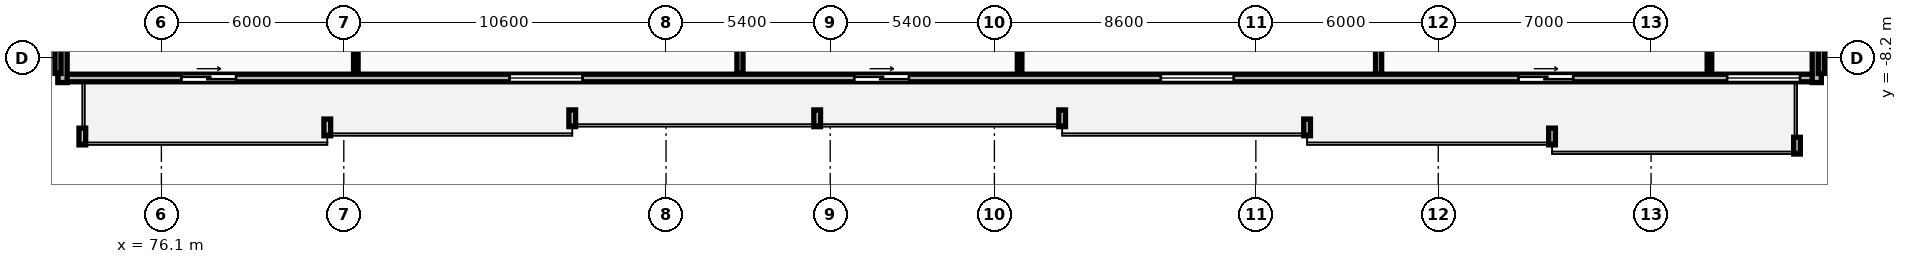
"""IFC4 building model, lengths in metres.
Left out: names, types, materials, properties, quantities, classifications, styles, units other than length and angle.
Written with IfcOpenShell. Run it as: python <this file> out.ifc"""

import sys

from ifc_helpers import new_model, si_unit, direction, frame, frame_2d, origin, place, context, subcontext, project, spatial, rectangle, extrude, element, fill, save


model = new_model("IFC4")
c1 = context("Model", 3, precision=1e-05, world=origin(), true_north=direction((0.0, 1.0)))
c2 = subcontext(c1, "Body", "Model", "MODEL_VIEW")
j1 = project(units=[si_unit("LENGTHUNIT", "METRE"), si_unit("PLANEANGLEUNIT", "RADIAN")], contexts=[c1])
p1 = place(None, origin())
s1 = spatial("IfcSite", under=j1, at=p1, CompositionType="ELEMENT")
p2 = place(p1, origin())
s2 = spatial("IfcBuilding", under=s1, at=p2, CompositionType="ELEMENT")
p3 = place(p2, frame((0.0, 0.0, 153.7)))
s3 = spatial("IfcBuildingStorey", under=s2, at=p3, CompositionType="ELEMENT", Elevation=153.7)
p4 = place(p3, frame((72.7, -8.85, 0.0), z_axis=(0.0, 0.0, 1.0), x_axis=(1.0, 0.0, 0.0)))
e1 = element("IfcWall", 1, at=p4, inside=s3, PredefinedType="STANDARD", context=c2, shape_type="SweptSolid", body=[
    extrude(rectangle(XDim=58.0, YDim=0.25, at=frame_2d((29.0, 0.0))), origin(), (0.0, 0.0, 1.0), 3.32),
])
p5 = place(p4, frame((4.058, 0.0, 0.0)))
e2 = element("IfcOpeningElement", 2, at=p5, cuts=e1, PredefinedType="OPENING", context=c2, shape_type="SweptSolid", body=[
    extrude(rectangle(XDim=1.8, YDim=2.2, at=frame_2d((0.9, 1.1))), frame((0.0, 0.135, 0.0), z_axis=(0.0, -1.0, 0.0), x_axis=(1.0, 0.0, 0.0)), (0.0, 0.0, 1.0), 0.27),
])
p6 = place(p4, frame((14.854, 0.0, 0.85)))
e3 = element("IfcOpeningElement", 3, at=p6, cuts=e1, PredefinedType="OPENING", context=c2, shape_type="SweptSolid", body=[
    extrude(rectangle(XDim=2.4, YDim=1.9, at=frame_2d((1.2, 0.95))), frame((0.0, 0.135, 0.0), z_axis=(0.0, -1.0, 0.0), x_axis=(1.0, 0.0, 0.0)), (0.0, 0.0, 1.0), 0.27),
])
p7 = place(p4, frame((26.191, 0.0, 0.0)))
e4 = element("IfcOpeningElement", 4, at=p7, cuts=e1, PredefinedType="OPENING", context=c2, shape_type="SweptSolid", body=[
    extrude(rectangle(XDim=1.8, YDim=2.2, at=frame_2d((0.9, 1.1))), frame((0.0, 0.135, 0.0), z_axis=(0.0, -1.0, 0.0), x_axis=(1.0, 0.0, 0.0)), (0.0, 0.0, 1.0), 0.27),
])
p8 = place(p4, frame((36.274, 0.0, 0.85)))
e5 = element("IfcOpeningElement", 5, at=p8, cuts=e1, PredefinedType="OPENING", context=c2, shape_type="SweptSolid", body=[
    extrude(rectangle(XDim=2.4, YDim=1.9, at=frame_2d((1.2, 0.95))), frame((0.0, 0.135, 0.0), z_axis=(0.0, -1.0, 0.0), x_axis=(1.0, 0.0, 0.0)), (0.0, 0.0, 1.0), 0.27),
])
p9 = place(p4, frame((48.039, 0.0, 0.0)))
e6 = element("IfcOpeningElement", 6, at=p9, cuts=e1, PredefinedType="OPENING", context=c2, shape_type="SweptSolid", body=[
    extrude(rectangle(XDim=1.8, YDim=2.2, at=frame_2d((0.9, 1.1))), frame((0.0, 0.135, 0.0), z_axis=(0.0, -1.0, 0.0), x_axis=(1.0, 0.0, 0.0)), (0.0, 0.0, 1.0), 0.27),
])
p10 = place(p4, frame((54.9, 0.0, 0.85)))
e7 = element("IfcOpeningElement", 7, at=p10, cuts=e1, PredefinedType="OPENING", context=c2, shape_type="SweptSolid", body=[
    extrude(rectangle(XDim=2.4, YDim=1.9, at=frame_2d((1.2, 0.95))), frame((0.0, 0.135, 0.0), z_axis=(0.0, -1.0, 0.0), x_axis=(1.0, 0.0, 0.0)), (0.0, 0.0, 1.0), 0.27),
])
for number, where, z_axis, x_axis in (
    (8, (130.55, -9.0, 0.0), (0.0, 0.0, 1.0), (0.0, 1.0, 0.0)),
    (9, (72.85, -5.4, 0.0), (0.0, 0.0, 1.0), (0.0, -1.0, 0.0)),
):
    element("IfcWall", number, at=place(p3, frame(where, z_axis=z_axis, x_axis=x_axis)), inside=s3, PredefinedType="STANDARD", context=c2, shape_type="SweptSolid", body=[
        extrude(rectangle(XDim=3.6, YDim=0.3, at=frame_2d((1.8, 0.0))), origin(), (0.0, 0.0, 1.0), 3.32),
    ])
for number, where, z_axis, x_axis in (
    (10, (72.7, -8.7, 0.0), (0.0, 0.0, 1.0), (0.0, 1.0, 0.0)),
    (11, (130.7, -8.7, 0.0), (0.0, 0.0, 1.0), (0.0, 1.0, 0.0)),
    (12, (95.132, -8.7, 0.0), (0.0, 0.0, 1.0), (0.0, 1.0, 0.0)),
):
    element("IfcWall", number, at=place(p3, frame(where, z_axis=z_axis, x_axis=x_axis)), inside=s3, PredefinedType="PARTITIONING", context=c2, shape_type="SweptSolid", body=[
        extrude(rectangle(XDim=24.57, YDim=0.2, at=frame_2d((12.285, 0.0))), origin(), (0.0, 0.0, 1.0), 3.32),
    ])
p11 = place(p3, frame((82.496, -8.7, 0.0), z_axis=(0.0, 0.0, 1.0), x_axis=(0.0, 1.0, 0.0)))
e13 = element("IfcWall", 13, at=p11, inside=s3, PredefinedType="PARTITIONING", context=c2, shape_type="SweptSolid", body=[
    extrude(rectangle(XDim=5.17, YDim=0.15, at=frame_2d((2.585, 0.0))), origin(), (0.0, 0.0, 1.0), 3.32),
])
p12 = place(p3, frame((116.138, -8.7, 0.0), z_axis=(0.0, 0.0, 1.0), x_axis=(0.0, 1.0, 0.0)))
e14 = element("IfcWall", 14, at=p12, inside=s3, PredefinedType="PARTITIONING", context=c2, shape_type="SweptSolid", body=[
    extrude(rectangle(XDim=24.57, YDim=0.2, at=frame_2d((12.285, 0.0))), origin(), (0.0, 0.0, 1.0), 3.32),
])
p13 = place(p3, frame((104.33, -8.7, 0.0), z_axis=(0.0, 0.0, 1.0), x_axis=(0.0, 1.0, 0.0)))
e15 = element("IfcWall", 15, at=p13, inside=s3, PredefinedType="PARTITIONING", context=c2, shape_type="SweptSolid", body=[
    extrude(rectangle(XDim=5.17, YDim=0.15, at=frame_2d((2.585, 0.0))), origin(), (0.0, 0.0, 1.0), 3.32),
])
p14 = place(p3, frame((127.02, -8.7, 0.0), z_axis=(0.0, 0.0, 1.0), x_axis=(0.0, 1.0, 0.0)))
e16 = element("IfcWall", 16, at=p14, inside=s3, PredefinedType="PARTITIONING", context=c2, shape_type="SweptSolid", body=[
    extrude(rectangle(XDim=10.31, YDim=0.15, at=frame_2d((5.155, 0.0))), origin(), (0.0, 0.0, 1.0), 3.32),
])
p15 = place(p14, frame((5.897, 0.0, 0.0)))
e17 = element("IfcOpeningElement", 17, at=p15, cuts=e16, PredefinedType="OPENING", context=c2, shape_type="SweptSolid", body=[
    extrude(rectangle(XDim=0.84, YDim=2.04, at=frame_2d((0.42, 1.02))), frame((0.0, 0.085, 0.0), z_axis=(0.0, -1.0, 0.0), x_axis=(1.0, 0.0, 0.0)), (0.0, 0.0, 1.0), 0.17),
])
p16 = place(p14, frame((8.04, 0.0, 0.0)))
e18 = element("IfcOpeningElement", 18, at=p16, cuts=e16, PredefinedType="OPENING", context=c2, shape_type="SweptSolid", body=[
    extrude(rectangle(XDim=0.84, YDim=2.04, at=frame_2d((0.42, 1.02))), frame((0.0, 0.085, 0.0), z_axis=(0.0, -1.0, 0.0), x_axis=(1.0, 0.0, 0.0)), (0.0, 0.0, 1.0), 0.17),
])
p17 = place(p14, frame((2.21, 0.0, 0.0)))
e19 = element("IfcOpeningElement", 19, at=p17, cuts=e16, PredefinedType="OPENING", context=c2, shape_type="SweptSolid", body=[
    extrude(rectangle(XDim=0.88, YDim=2.06, at=frame_2d((0.44, 1.03))), frame((0.0, 0.085, 0.0), z_axis=(0.0, -1.0, 0.0), x_axis=(1.0, 0.0, 0.0)), (0.0, 0.0, 1.0), 0.17),
])
p18 = place(p5, origin())
e20 = element("IfcDoor", 20, at=p18, inside=s3, OperationType="SLIDING_TO_RIGHT", PredefinedType="DOOR", context=c2, shape_type="SweptSolid", body=[
    extrude(rectangle(XDim=1.8, YDim=2.2, at=frame_2d((0.9, 1.1))), frame((0.0, 0.025, 0.0), z_axis=(0.0, -1.0, 0.0), x_axis=(1.0, 0.0, 0.0)), (0.0, 0.0, 1.0), 0.05),
])
fill(e2, e20)
p19 = place(p6, origin())
e21 = element("IfcWindow", 21, at=p19, inside=s3, PartitioningType="DOUBLE_PANEL_VERTICAL", PredefinedType="WINDOW", context=c2, shape_type="SweptSolid", body=[
    extrude(rectangle(XDim=2.4, YDim=1.9, at=frame_2d((1.2, 0.95))), frame((0.0, 0.03, 0.0), z_axis=(0.0, -1.0, 0.0), x_axis=(1.0, 0.0, 0.0)), (0.0, 0.0, 1.0), 0.06),
])
fill(e3, e21)
p20 = place(p7, origin())
e22 = element("IfcDoor", 22, at=p20, inside=s3, OperationType="SLIDING_TO_RIGHT", PredefinedType="DOOR", context=c2, shape_type="SweptSolid", body=[
    extrude(rectangle(XDim=1.8, YDim=2.2, at=frame_2d((0.9, 1.1))), frame((0.0, 0.025, 0.0), z_axis=(0.0, -1.0, 0.0), x_axis=(1.0, 0.0, 0.0)), (0.0, 0.0, 1.0), 0.05),
])
fill(e4, e22)
p21 = place(p8, origin())
e23 = element("IfcWindow", 23, at=p21, inside=s3, PartitioningType="DOUBLE_PANEL_VERTICAL", PredefinedType="WINDOW", context=c2, shape_type="SweptSolid", body=[
    extrude(rectangle(XDim=2.4, YDim=1.9, at=frame_2d((1.2, 0.95))), frame((0.0, 0.03, 0.0), z_axis=(0.0, -1.0, 0.0), x_axis=(1.0, 0.0, 0.0)), (0.0, 0.0, 1.0), 0.06),
])
fill(e5, e23)
p22 = place(p9, origin())
e24 = element("IfcDoor", 24, at=p22, inside=s3, OperationType="SLIDING_TO_RIGHT", PredefinedType="DOOR", context=c2, shape_type="SweptSolid", body=[
    extrude(rectangle(XDim=1.8, YDim=2.2, at=frame_2d((0.9, 1.1))), frame((0.0, 0.025, 0.0), z_axis=(0.0, -1.0, 0.0), x_axis=(1.0, 0.0, 0.0)), (0.0, 0.0, 1.0), 0.05),
])
fill(e6, e24)
p23 = place(p10, origin())
e25 = element("IfcWindow", 25, at=p23, inside=s3, PartitioningType="DOUBLE_PANEL_VERTICAL", PredefinedType="WINDOW", context=c2, shape_type="SweptSolid", body=[
    extrude(rectangle(XDim=2.4, YDim=1.9, at=frame_2d((1.2, 0.95))), frame((0.0, 0.03, 0.0), z_axis=(0.0, -1.0, 0.0), x_axis=(1.0, 0.0, 0.0)), (0.0, 0.0, 1.0), 0.06),
])
fill(e7, e25)
save(model, sys.argv[1])
